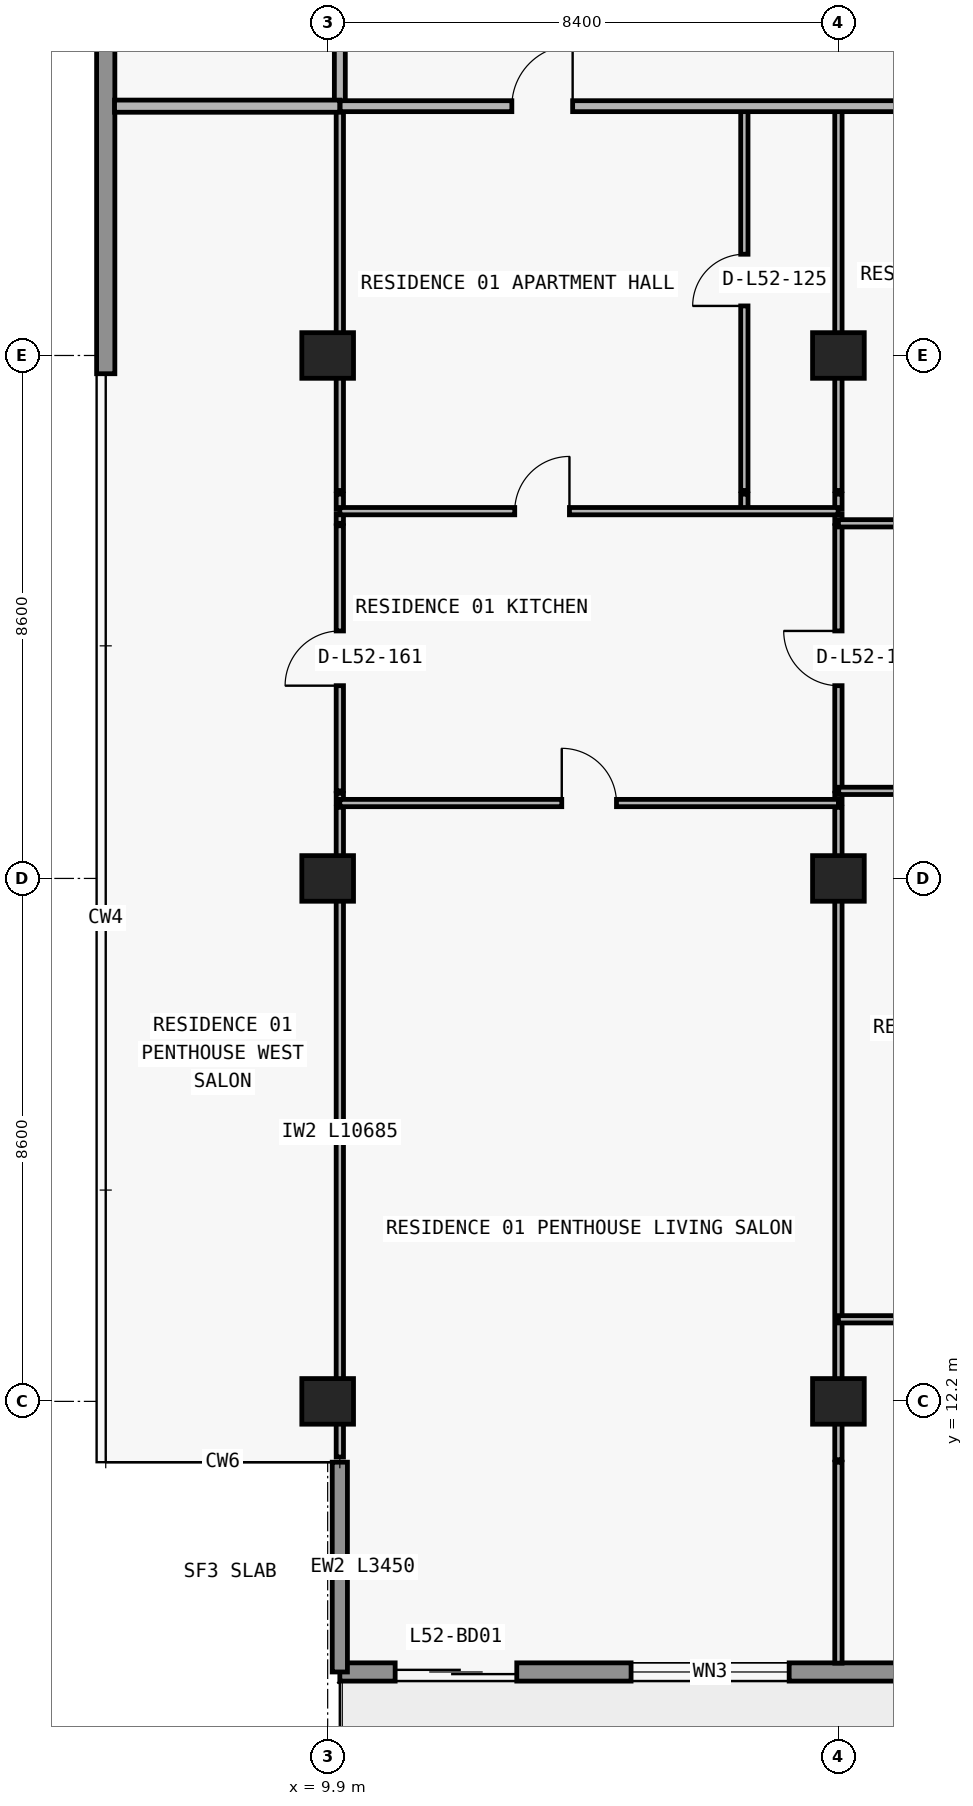
"""IFC4 building model, lengths in metres.
Left out: names, types, materials, properties, quantities, classifications, styles, units other than length and angle.
Written with IfcOpenShell. Run it as: python <this file> out.ifc"""

import sys

from ifc_helpers import new_model, si_unit, direction, frame, frame_2d, origin, origin_2d, place, context, subcontext, project, spatial, rectangle, extrude, element, fill, save


model = new_model("IFC4")
c1 = context("Model", 3, precision=1e-05, world=origin(), true_north=direction((0.0, 1.0)))
c2 = subcontext(c1, "Body", "Model", "MODEL_VIEW")
j1 = project(units=[si_unit("LENGTHUNIT", "METRE"), si_unit("PLANEANGLEUNIT", "RADIAN")], contexts=[c1])
p1 = place(None, origin())
s1 = spatial("IfcSite", under=j1, at=p1, CompositionType="ELEMENT")
p2 = place(p1, origin())
s2 = spatial("IfcBuilding", under=s1, at=p2, CompositionType="ELEMENT")
p3 = place(p2, frame((0.0, 0.0, 188.4)))
s3 = spatial("IfcBuildingStorey", under=s2, at=p3, CompositionType="ELEMENT", Elevation=188.4)
for number, where, z_axis, x_axis in (
    (1, (9.9, 12.2, 0.0), (0.0, 0.0, 1.0), (1.0, 0.0, 0.0)),
    (2, (18.3, 12.2, 0.0), (0.0, 0.0, 1.0), (1.0, 0.0, 0.0)),
    (3, (9.9, 20.8, 0.0), (0.0, 0.0, 1.0), (1.0, 0.0, 0.0)),
    (4, (18.3, 20.8, 0.0), (0.0, 0.0, 1.0), (1.0, 0.0, 0.0)),
    (5, (9.9, 29.4, 0.0), (0.0, 0.0, 1.0), (1.0, 0.0, 0.0)),
    (6, (18.3, 29.4, 0.0), (0.0, 0.0, 1.0), (1.0, 0.0, 0.0)),
):
    element("IfcColumn", number, at=place(p3, frame(where, z_axis=z_axis, x_axis=x_axis)), inside=s3, PredefinedType="COLUMN", context=c2, shape_type="SweptSolid", body=[
        extrude(rectangle(XDim=0.85, YDim=0.75, at=origin_2d()), origin(), (0.0, 0.0, 1.0), 3.05),
    ])
p4 = place(p3, frame((67.7, 7.75, 0.0), z_axis=(0.0, 0.0, 1.0), x_axis=(-1.0, 0.0, 0.0)))
e7 = element("IfcWall", 7, at=p4, inside=s3, PredefinedType="STANDARD", context=c2, shape_type="SweptSolid", body=[
    extrude(rectangle(XDim=57.6, YDim=0.3, at=frame_2d((28.8, 0.0))), origin(), (0.0, 0.0, 1.0), 3.05),
])
p5 = place(p4, frame((54.69, 0.0, 0.0)))
e8 = element("IfcOpeningElement", 8, at=p5, cuts=e7, PredefinedType="OPENING", context=c2, shape_type="SweptSolid", body=[
    extrude(rectangle(XDim=2.0, YDim=2.3, at=frame_2d((1.0, 1.15))), frame((0.0, 0.16, 0.0), z_axis=(0.0, -1.0, 0.0), x_axis=(1.0, 0.0, 0.0)), (0.0, 0.0, 1.0), 0.32),
])
p6 = place(p4, frame((50.21, 0.0, 0.65)))
e9 = element("IfcOpeningElement", 9, at=p6, cuts=e7, PredefinedType="OPENING", context=c2, shape_type="SweptSolid", body=[
    extrude(rectangle(XDim=2.6, YDim=1.85, at=frame_2d((1.3, 0.925))), frame((0.0, 0.16, 0.0), z_axis=(0.0, -1.0, 0.0), x_axis=(1.0, 0.0, 0.0)), (0.0, 0.0, 1.0), 0.32),
])
p7 = place(p4, frame((44.1, 0.0, 0.85)))
e10 = element("IfcOpeningElement", 10, at=p7, cuts=e7, PredefinedType="OPENING", context=c2, shape_type="SweptSolid", body=[
    extrude(rectangle(XDim=2.2, YDim=1.55, at=frame_2d((1.1, 0.775))), frame((0.0, 0.16, 0.0), z_axis=(0.0, -1.0, 0.0), x_axis=(1.0, 0.0, 0.0)), (0.0, 0.0, 1.0), 0.32),
])
p8 = place(p4, frame((37.69, 0.0, 0.0)))
e11 = element("IfcOpeningElement", 11, at=p8, cuts=e7, PredefinedType="OPENING", context=c2, shape_type="SweptSolid", body=[
    extrude(rectangle(XDim=2.0, YDim=2.3, at=frame_2d((1.0, 1.15))), frame((0.0, 0.16, 0.0), z_axis=(0.0, -1.0, 0.0), x_axis=(1.0, 0.0, 0.0)), (0.0, 0.0, 1.0), 0.32),
])
p9 = place(p4, frame((33.59, 0.0, 0.85)))
e12 = element("IfcOpeningElement", 12, at=p9, cuts=e7, PredefinedType="OPENING", context=c2, shape_type="SweptSolid", body=[
    extrude(rectangle(XDim=1.8, YDim=1.55, at=frame_2d((0.9, 0.775))), frame((0.0, 0.16, 0.0), z_axis=(0.0, -1.0, 0.0), x_axis=(1.0, 0.0, 0.0)), (0.0, 0.0, 1.0), 0.32),
])
p10 = place(p4, frame((29.69, 0.0, 0.0)))
e13 = element("IfcOpeningElement", 13, at=p10, cuts=e7, PredefinedType="OPENING", context=c2, shape_type="SweptSolid", body=[
    extrude(rectangle(XDim=2.0, YDim=2.3, at=frame_2d((1.0, 1.15))), frame((0.0, 0.16, 0.0), z_axis=(0.0, -1.0, 0.0), x_axis=(1.0, 0.0, 0.0)), (0.0, 0.0, 1.0), 0.32),
])
p11 = place(p4, frame((25.81, 0.0, 0.65)))
e14 = element("IfcOpeningElement", 14, at=p11, cuts=e7, PredefinedType="OPENING", context=c2, shape_type="SweptSolid", body=[
    extrude(rectangle(XDim=2.6, YDim=1.85, at=frame_2d((1.3, 0.925))), frame((0.0, 0.16, 0.0), z_axis=(0.0, -1.0, 0.0), x_axis=(1.0, 0.0, 0.0)), (0.0, 0.0, 1.0), 0.32),
])
p12 = place(p4, frame((19.7, 0.0, 0.85)))
e15 = element("IfcOpeningElement", 15, at=p12, cuts=e7, PredefinedType="OPENING", context=c2, shape_type="SweptSolid", body=[
    extrude(rectangle(XDim=2.2, YDim=1.55, at=frame_2d((1.1, 0.775))), frame((0.0, 0.16, 0.0), z_axis=(0.0, -1.0, 0.0), x_axis=(1.0, 0.0, 0.0)), (0.0, 0.0, 1.0), 0.32),
])
p13 = place(p4, frame((13.29, 0.0, 0.0)))
e16 = element("IfcOpeningElement", 16, at=p13, cuts=e7, PredefinedType="OPENING", context=c2, shape_type="SweptSolid", body=[
    extrude(rectangle(XDim=2.0, YDim=2.3, at=frame_2d((1.0, 1.15))), frame((0.0, 0.16, 0.0), z_axis=(0.0, -1.0, 0.0), x_axis=(1.0, 0.0, 0.0)), (0.0, 0.0, 1.0), 0.32),
])
p14 = place(p4, frame((9.19, 0.0, 0.85)))
e17 = element("IfcOpeningElement", 17, at=p14, cuts=e7, PredefinedType="OPENING", context=c2, shape_type="SweptSolid", body=[
    extrude(rectangle(XDim=1.8, YDim=1.55, at=frame_2d((0.9, 0.775))), frame((0.0, 0.16, 0.0), z_axis=(0.0, -1.0, 0.0), x_axis=(1.0, 0.0, 0.0)), (0.0, 0.0, 1.0), 0.32),
])
p15 = place(p4, frame((5.273, 0.0, 0.0)))
e18 = element("IfcOpeningElement", 18, at=p15, cuts=e7, PredefinedType="OPENING", context=c2, shape_type="SweptSolid", body=[
    extrude(rectangle(XDim=2.0, YDim=2.3, at=frame_2d((1.0, 1.15))), frame((0.0, 0.16, 0.0), z_axis=(0.0, -1.0, 0.0), x_axis=(1.0, 0.0, 0.0)), (0.0, 0.0, 1.0), 0.32),
])
p16 = place(p4, frame((1.073, 0.0, 0.85)))
e19 = element("IfcOpeningElement", 19, at=p16, cuts=e7, PredefinedType="OPENING", context=c2, shape_type="SweptSolid", body=[
    extrude(rectangle(XDim=2.2, YDim=1.55, at=frame_2d((1.1, 0.775))), frame((0.0, 0.16, 0.0), z_axis=(0.0, -1.0, 0.0), x_axis=(1.0, 0.0, 0.0)), (0.0, 0.0, 1.0), 0.32),
])
p17 = place(p3, frame((10.1, 11.2, 0.0), z_axis=(0.0, 0.0, 1.0), x_axis=(0.0, -1.0, 0.0)))
e20 = element("IfcWall", 20, at=p17, inside=s3, PredefinedType="ELEMENTEDWALL", context=c2, shape_type="SweptSolid", body=[
    extrude(rectangle(XDim=3.45, YDim=0.25, at=frame_2d((1.725, 0.0))), origin(), (0.0, 0.0, 1.0), 3.05),
])
p18 = place(p3, frame((6.25, 29.1, 0.0), z_axis=(0.0, 0.0, 1.0), x_axis=(0.0, 1.0, 0.0)))
e21 = element("IfcWall", 21, at=p18, inside=s3, PredefinedType="STANDARD", context=c2, shape_type="SweptSolid", body=[
    extrude(rectangle(XDim=17.9, YDim=0.3, at=frame_2d((8.95, 0.0))), origin(), (0.0, 0.0, 1.0), 3.05),
])
p19 = place(p3, frame((10.1, 11.285, 0.0), z_axis=(0.0, 0.0, 1.0), x_axis=(0.0, 1.0, 0.0)))
e22 = element("IfcWall", 22, at=p19, inside=s3, PredefinedType="PARTITIONING", context=c2, shape_type="SweptSolid", body=[
    extrude(rectangle(XDim=10.685, YDim=0.12, at=frame_2d((5.343, 0.0))), origin(), (0.0, 0.0, 1.0), 2.263),
])
p20 = place(p3, frame((10.1, 22.04, 0.0), z_axis=(0.0, 0.0, 1.0), x_axis=(0.0, 1.0, 0.0)))
e23 = element("IfcWall", 23, at=p20, inside=s3, PredefinedType="PARTITIONING", context=c2, shape_type="SweptSolid", body=[
    extrude(rectangle(XDim=0.16, YDim=0.12, at=frame_2d((0.08, 0.0))), origin(), (0.0, 0.0, 1.0), 2.263),
])
p21 = place(p3, frame((10.1, 22.24, 0.0), z_axis=(0.0, 0.0, 1.0), x_axis=(0.0, 1.0, 0.0)))
e24 = element("IfcWall", 24, at=p21, inside=s3, PredefinedType="PARTITIONING", context=c2, shape_type="SweptSolid", body=[
    extrude(rectangle(XDim=4.36, YDim=0.12, at=frame_2d((2.18, 0.0))), origin(), (0.0, 0.0, 1.0), 2.263),
])
p22 = place(p21, frame((1.73, 0.0, 0.0)))
e25 = element("IfcOpeningElement", 25, at=p22, cuts=e24, PredefinedType="OPENING", context=c2, shape_type="SweptSolid", body=[
    extrude(rectangle(XDim=0.9, YDim=2.15, at=frame_2d((0.45, 1.075))), frame((0.0, 0.07, 0.0), z_axis=(0.0, -1.0, 0.0), x_axis=(1.0, 0.0, 0.0)), (0.0, 0.0, 1.0), 0.14),
])
p23 = place(p3, frame((10.1, 26.64, 0.0), z_axis=(0.0, 0.0, 1.0), x_axis=(0.0, 1.0, 0.0)))
e26 = element("IfcWall", 26, at=p23, inside=s3, PredefinedType="PARTITIONING", context=c2, shape_type="SweptSolid", body=[
    extrude(rectangle(XDim=0.16, YDim=0.12, at=frame_2d((0.08, 0.0))), origin(), (0.0, 0.0, 1.0), 2.263),
])
p24 = place(p3, frame((10.1, 26.88, 0.0), z_axis=(0.0, 0.0, 1.0), x_axis=(0.0, 1.0, 0.0)))
e27 = element("IfcWall", 27, at=p24, inside=s3, PredefinedType="PARTITIONING", context=c2, shape_type="SweptSolid", body=[
    extrude(rectangle(XDim=0.24, YDim=0.12, at=frame_2d((0.12, 0.0))), origin(), (0.0, 0.0, 1.0), 2.263),
])
p25 = place(p3, frame((10.1, 27.18, 0.0), z_axis=(0.0, 0.0, 1.0), x_axis=(0.0, 1.0, 0.0)))
e28 = element("IfcWall", 28, at=p25, inside=s3, PredefinedType="PARTITIONING", context=c2, shape_type="SweptSolid", body=[
    extrude(rectangle(XDim=6.32, YDim=0.12, at=frame_2d((3.16, 0.0))), origin(), (0.0, 0.0, 1.0), 2.263),
])
p26 = place(p3, frame((10.1, 33.505, 0.0), z_axis=(0.0, 0.0, 1.0), x_axis=(0.0, 1.0, 0.0)))
e29 = element("IfcWall", 29, at=p26, inside=s3, PredefinedType="PARTITIONING", context=c2, shape_type="SweptSolid", body=[
    extrude(rectangle(XDim=3.495, YDim=0.18, at=frame_2d((1.748, 0.0))), origin(), (0.0, 0.0, 1.0), 2.263),
])
p27 = place(p3, frame((16.753, 26.88, 0.0), z_axis=(0.0, 0.0, 1.0), x_axis=(0.0, 1.0, 0.0)))
e30 = element("IfcWall", 30, at=p27, inside=s3, PredefinedType="PARTITIONING", context=c2, shape_type="SweptSolid", body=[
    extrude(rectangle(XDim=0.24, YDim=0.12, at=frame_2d((0.12, 0.0))), origin(), (0.0, 0.0, 1.0), 3.05),
])
p28 = place(p3, frame((16.753, 27.18, 0.0), z_axis=(0.0, 0.0, 1.0), x_axis=(0.0, 1.0, 0.0)))
e31 = element("IfcWall", 31, at=p28, inside=s3, PredefinedType="PARTITIONING", context=c2, shape_type="SweptSolid", body=[
    extrude(rectangle(XDim=6.32, YDim=0.12, at=frame_2d((3.16, 0.0))), origin(), (0.0, 0.0, 1.0), 3.05),
])
p29 = place(p28, frame((3.035, 0.0, 0.0)))
e32 = element("IfcOpeningElement", 32, at=p29, cuts=e31, PredefinedType="OPENING", context=c2, shape_type="SweptSolid", body=[
    extrude(rectangle(XDim=0.85, YDim=2.1, at=frame_2d((0.425, 1.05))), frame((0.0, 0.07, 0.0), z_axis=(0.0, -1.0, 0.0), x_axis=(1.0, 0.0, 0.0)), (0.0, 0.0, 1.0), 0.14),
])
p30 = place(p3, frame((18.3, 7.895, 0.0), z_axis=(0.0, 0.0, 1.0), x_axis=(0.0, 1.0, 0.0)))
e33 = element("IfcWall", 33, at=p30, inside=s3, PredefinedType="PARTITIONING", context=c2, shape_type="SweptSolid", body=[
    extrude(rectangle(XDim=3.305, YDim=0.12, at=frame_2d((1.652, 0.0))), origin(), (0.0, 0.0, 1.0), 3.05),
])
p31 = place(p3, frame((18.3, 11.24, 0.0), z_axis=(0.0, 0.0, 1.0), x_axis=(0.0, 1.0, 0.0)))
e34 = element("IfcWall", 34, at=p31, inside=s3, PredefinedType="PARTITIONING", context=c2, shape_type="SweptSolid", body=[
    extrude(rectangle(XDim=10.73, YDim=0.12, at=frame_2d((5.365, 0.0))), origin(), (0.0, 0.0, 1.0), 2.263),
])
p32 = place(p3, frame((18.3, 22.04, 0.0), z_axis=(0.0, 0.0, 1.0), x_axis=(0.0, 1.0, 0.0)))
e35 = element("IfcWall", 35, at=p32, inside=s3, PredefinedType="PARTITIONING", context=c2, shape_type="SweptSolid", body=[
    extrude(rectangle(XDim=0.16, YDim=0.12, at=frame_2d((0.08, 0.0))), origin(), (0.0, 0.0, 1.0), 2.263),
])
p33 = place(p3, frame((18.3, 22.24, 0.0), z_axis=(0.0, 0.0, 1.0), x_axis=(0.0, 1.0, 0.0)))
e36 = element("IfcWall", 36, at=p33, inside=s3, PredefinedType="PARTITIONING", context=c2, shape_type="SweptSolid", body=[
    extrude(rectangle(XDim=4.36, YDim=0.12, at=frame_2d((2.18, 0.0))), origin(), (0.0, 0.0, 1.0), 2.263),
])
p34 = place(p33, frame((1.73, 0.0, 0.0)))
e37 = element("IfcOpeningElement", 37, at=p34, cuts=e36, PredefinedType="OPENING", context=c2, shape_type="SweptSolid", body=[
    extrude(rectangle(XDim=0.9, YDim=2.15, at=frame_2d((0.45, 1.075))), frame((0.0, 0.07, 0.0), z_axis=(0.0, -1.0, 0.0), x_axis=(1.0, 0.0, 0.0)), (0.0, 0.0, 1.0), 0.14),
])
p35 = place(p3, frame((18.3, 26.64, 0.0), z_axis=(0.0, 0.0, 1.0), x_axis=(0.0, 1.0, 0.0)))
e38 = element("IfcWall", 38, at=p35, inside=s3, PredefinedType="PARTITIONING", context=c2, shape_type="SweptSolid", body=[
    extrude(rectangle(XDim=0.16, YDim=0.12, at=frame_2d((0.08, 0.0))), origin(), (0.0, 0.0, 1.0), 2.263),
])
p36 = place(p3, frame((18.3, 26.88, 0.0), z_axis=(0.0, 0.0, 1.0), x_axis=(0.0, 1.0, 0.0)))
e39 = element("IfcWall", 39, at=p36, inside=s3, PredefinedType="PARTITIONING", context=c2, shape_type="SweptSolid", body=[
    extrude(rectangle(XDim=0.24, YDim=0.12, at=frame_2d((0.12, 0.0))), origin(), (0.0, 0.0, 1.0), 2.263),
])
p37 = place(p3, frame((18.3, 27.18, 0.0), z_axis=(0.0, 0.0, 1.0), x_axis=(0.0, 1.0, 0.0)))
e40 = element("IfcWall", 40, at=p37, inside=s3, PredefinedType="PARTITIONING", context=c2, shape_type="SweptSolid", body=[
    extrude(rectangle(XDim=6.32, YDim=0.12, at=frame_2d((3.16, 0.0))), origin(), (0.0, 0.0, 1.0), 2.263),
])
p38 = place(p3, frame((18.3, 13.55, 0.0), z_axis=(0.0, 0.0, 1.0), x_axis=(1.0, 0.0, 0.0)))
e41 = element("IfcWall", 41, at=p38, inside=s3, PredefinedType="PARTITIONING", context=c2, shape_type="SweptSolid", body=[
    extrude(rectangle(XDim=8.35, YDim=0.12, at=frame_2d((4.175, 0.0))), origin(), (0.0, 0.0, 1.0), 3.05),
])
p39 = place(p38, frame((3.725, 0.0, 0.0)))
e42 = element("IfcOpeningElement", 42, at=p39, cuts=e41, PredefinedType="OPENING", context=c2, shape_type="SweptSolid", body=[
    extrude(rectangle(XDim=0.9, YDim=2.15, at=frame_2d((0.45, 1.075))), frame((0.0, 0.07, 0.0), z_axis=(0.0, -1.0, 0.0), x_axis=(1.0, 0.0, 0.0)), (0.0, 0.0, 1.0), 0.14),
])
p40 = place(p3, frame((10.1, 22.04, 0.0), z_axis=(0.0, 0.0, 1.0), x_axis=(1.0, 0.0, 0.0)))
e43 = element("IfcWall", 43, at=p40, inside=s3, PredefinedType="PARTITIONING", context=c2, shape_type="SweptSolid", body=[
    extrude(rectangle(XDim=8.2, YDim=0.12, at=frame_2d((4.1, 0.0))), origin(), (0.0, 0.0, 1.0), 3.05),
])
p41 = place(p40, frame((3.65, 0.0, 0.0)))
e44 = element("IfcOpeningElement", 44, at=p41, cuts=e43, PredefinedType="OPENING", context=c2, shape_type="SweptSolid", body=[
    extrude(rectangle(XDim=0.9, YDim=2.15, at=frame_2d((0.45, 1.075))), frame((0.0, 0.07, 0.0), z_axis=(0.0, -1.0, 0.0), x_axis=(1.0, 0.0, 0.0)), (0.0, 0.0, 1.0), 0.14),
])
p42 = place(p3, frame((18.305, 22.24, 0.0), z_axis=(0.0, 0.0, 1.0), x_axis=(1.0, 0.0, 0.0)))
e45 = element("IfcWall", 45, at=p42, inside=s3, PredefinedType="PARTITIONING", context=c2, shape_type="SweptSolid", body=[
    extrude(rectangle(XDim=8.175, YDim=0.12, at=frame_2d((4.087, 0.0))), origin(), (0.0, 0.0, 1.0), 3.05),
])
p43 = place(p42, frame((3.637, 0.0, 0.0)))
e46 = element("IfcOpeningElement", 46, at=p43, cuts=e45, PredefinedType="OPENING", context=c2, shape_type="SweptSolid", body=[
    extrude(rectangle(XDim=0.9, YDim=2.15, at=frame_2d((0.45, 1.075))), frame((0.0, 0.07, 0.0), z_axis=(0.0, -1.0, 0.0), x_axis=(1.0, 0.0, 0.0)), (0.0, 0.0, 1.0), 0.14),
])
p44 = place(p3, frame((18.3, 26.64, 0.0), z_axis=(0.0, 0.0, 1.0), x_axis=(1.0, 0.0, 0.0)))
e47 = element("IfcWall", 47, at=p44, inside=s3, PredefinedType="PARTITIONING", context=c2, shape_type="SweptSolid", body=[
    extrude(rectangle(XDim=8.18, YDim=0.12, at=frame_2d((4.09, 0.0))), origin(), (0.0, 0.0, 1.0), 3.05),
])
p45 = place(p44, frame((3.0, 0.0, 0.0)))
e48 = element("IfcOpeningElement", 48, at=p45, cuts=e47, PredefinedType="OPENING", context=c2, shape_type="SweptSolid", body=[
    extrude(rectangle(XDim=0.9, YDim=2.15, at=frame_2d((0.45, 1.075))), frame((0.0, 0.07, 0.0), z_axis=(0.0, -1.0, 0.0), x_axis=(1.0, 0.0, 0.0)), (0.0, 0.0, 1.0), 0.14),
])
p46 = place(p3, frame((10.1, 26.84, 0.0), z_axis=(0.0, 0.0, 1.0), x_axis=(1.0, 0.0, 0.0)))
e49 = element("IfcWall", 49, at=p46, inside=s3, PredefinedType="PARTITIONING", context=c2, shape_type="SweptSolid", body=[
    extrude(rectangle(XDim=8.195, YDim=0.12, at=frame_2d((4.097, 0.0))), origin(), (0.0, 0.0, 1.0), 3.05),
])
p47 = place(p46, frame((2.876, 0.0, 0.0)))
e50 = element("IfcOpeningElement", 50, at=p47, cuts=e49, PredefinedType="OPENING", context=c2, shape_type="SweptSolid", body=[
    extrude(rectangle(XDim=0.9, YDim=2.15, at=frame_2d((0.45, 1.075))), frame((0.0, 0.07, 0.0), z_axis=(0.0, -1.0, 0.0), x_axis=(1.0, 0.0, 0.0)), (0.0, 0.0, 1.0), 0.14),
])
p48 = place(p3, frame((6.395, 33.5, 0.0), z_axis=(0.0, 0.0, 1.0), x_axis=(1.0, 0.0, 0.0)))
e51 = element("IfcWall", 51, at=p48, inside=s3, PredefinedType="PARTITIONING", context=c2, shape_type="SweptSolid", body=[
    extrude(rectangle(XDim=3.705, YDim=0.2, at=frame_2d((1.853, 0.0))), origin(), (0.0, 0.0, 1.0), 3.05),
])
p49 = place(p3, frame((10.105, 33.5, 0.0), z_axis=(0.0, 0.0, 1.0), x_axis=(1.0, 0.0, 0.0)))
e52 = element("IfcWall", 52, at=p49, inside=s3, PredefinedType="PARTITIONING", context=c2, shape_type="SweptSolid", body=[
    extrude(rectangle(XDim=16.545, YDim=0.18, at=frame_2d((8.272, 0.0))), origin(), (0.0, 0.0, 1.0), 3.05),
])
p50 = place(p49, frame((2.824, 0.0, 0.0)))
e53 = element("IfcOpeningElement", 53, at=p50, cuts=e52, PredefinedType="OPENING", context=c2, shape_type="SweptSolid", body=[
    extrude(rectangle(XDim=1.0, YDim=2.2, at=frame_2d((0.5, 1.1))), frame((0.0, 0.1, 0.0), z_axis=(0.0, -1.0, 0.0), x_axis=(1.0, 0.0, 0.0)), (0.0, 0.0, 1.0), 0.2),
])
p51 = place(p5, origin())
e54 = element("IfcDoor", 54, at=p51, inside=s3, OperationType="DOUBLE_DOOR_SLIDING", PredefinedType="DOOR", context=c2, shape_type="SweptSolid", body=[
    extrude(rectangle(XDim=2.0, YDim=2.3, at=frame_2d((1.0, 1.15))), frame((0.0, 0.025, 0.0), z_axis=(0.0, -1.0, 0.0), x_axis=(1.0, 0.0, 0.0)), (0.0, 0.0, 1.0), 0.05),
])
fill(e8, e54)
p52 = place(p6, origin())
e55 = element("IfcWindow", 55, at=p52, inside=s3, PartitioningType="SINGLE_PANEL", PredefinedType="WINDOW", context=c2, shape_type="SweptSolid", body=[
    extrude(rectangle(XDim=2.6, YDim=1.85, at=frame_2d((1.3, 0.925))), frame((0.0, 0.03, 0.0), z_axis=(0.0, -1.0, 0.0), x_axis=(1.0, 0.0, 0.0)), (0.0, 0.0, 1.0), 0.06),
])
fill(e9, e55)
p53 = place(p50, origin())
e56 = element("IfcDoor", 56, at=p53, inside=s3, OperationType="SINGLE_SWING_RIGHT", PredefinedType="DOOR", context=c2, shape_type="SweptSolid", body=[
    extrude(rectangle(XDim=1.0, YDim=2.2, at=frame_2d((0.5, 1.1))), frame((0.0, 0.025, 0.0), z_axis=(0.0, -1.0, 0.0), x_axis=(1.0, 0.0, 0.0)), (0.0, 0.0, 1.0), 0.05),
])
fill(e53, e56)
p54 = place(p29, origin())
e57 = element("IfcDoor", 57, at=p54, inside=s3, OperationType="SINGLE_SWING_LEFT", PredefinedType="DOOR", context=c2, shape_type="SweptSolid", body=[
    extrude(rectangle(XDim=0.85, YDim=2.1, at=frame_2d((0.425, 1.05))), frame((0.0, 0.025, 0.0), z_axis=(0.0, -1.0, 0.0), x_axis=(1.0, 0.0, 0.0)), (0.0, 0.0, 1.0), 0.05),
])
fill(e32, e57)
p55 = place(p47, origin())
e58 = element("IfcDoor", 58, at=p55, inside=s3, OperationType="SINGLE_SWING_RIGHT", PredefinedType="DOOR", context=c2, shape_type="SweptSolid", body=[
    extrude(rectangle(XDim=0.9, YDim=2.15, at=frame_2d((0.45, 1.075))), frame((0.0, 0.025, 0.0), z_axis=(0.0, -1.0, 0.0), x_axis=(1.0, 0.0, 0.0)), (0.0, 0.0, 1.0), 0.05),
])
fill(e50, e58)
p56 = place(p41, origin())
e59 = element("IfcDoor", 59, at=p56, inside=s3, OperationType="SINGLE_SWING_LEFT", PredefinedType="DOOR", context=c2, shape_type="SweptSolid", body=[
    extrude(rectangle(XDim=0.9, YDim=2.15, at=frame_2d((0.45, 1.075))), frame((0.0, 0.025, 0.0), z_axis=(0.0, -1.0, 0.0), x_axis=(1.0, 0.0, 0.0)), (0.0, 0.0, 1.0), 0.05),
])
fill(e44, e59)
p57 = place(p34, origin())
e60 = element("IfcDoor", 60, at=p57, inside=s3, OperationType="SINGLE_SWING_RIGHT", PredefinedType="DOOR", context=c2, shape_type="SweptSolid", body=[
    extrude(rectangle(XDim=0.9, YDim=2.15, at=frame_2d((0.45, 1.075))), frame((0.0, 0.025, 0.0), z_axis=(0.0, -1.0, 0.0), x_axis=(1.0, 0.0, 0.0)), (0.0, 0.0, 1.0), 0.05),
])
fill(e37, e60)
p58 = place(p22, origin())
e61 = element("IfcDoor", 61, at=p58, inside=s3, OperationType="SINGLE_SWING_LEFT", PredefinedType="DOOR", context=c2, shape_type="SweptSolid", body=[
    extrude(rectangle(XDim=0.9, YDim=2.15, at=frame_2d((0.45, 1.075))), frame((0.0, 0.025, 0.0), z_axis=(0.0, -1.0, 0.0), x_axis=(1.0, 0.0, 0.0)), (0.0, 0.0, 1.0), 0.05),
])
fill(e25, e61)
save(model, sys.argv[1])
